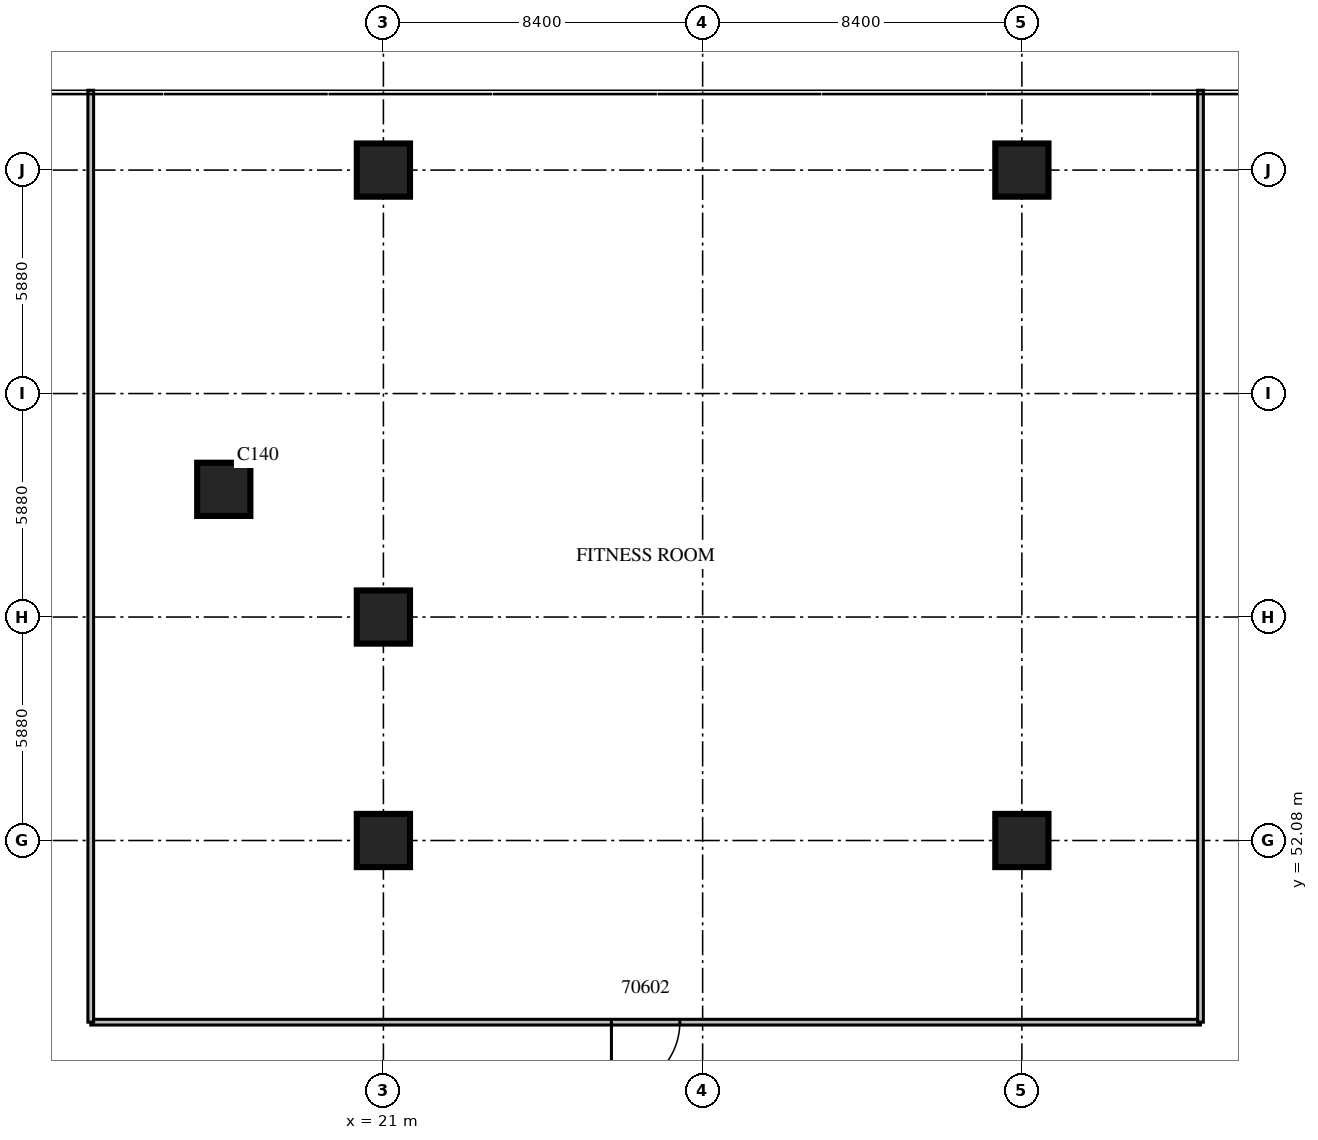
"""IFC4 building model, lengths in metres.
Left out: names, types, materials, properties, quantities, classifications, styles, units other than length and angle.
Written with IfcOpenShell. Run it as: python <this file> out.ifc"""

import sys

from ifc_helpers import new_model, si_unit, direction, frame, frame_2d, origin, origin_2d, place, context, subcontext, project, spatial, rectangle, extrude, source, transform, mapped, element, fill, save


model = new_model("IFC4")
c1 = context("Model", 3, precision=1e-05, world=origin(), true_north=direction((0.0, 1.0)))
c2 = subcontext(c1, "Body", "Model", "MODEL_VIEW")
j1 = project(units=[si_unit("LENGTHUNIT", "METRE"), si_unit("PLANEANGLEUNIT", "RADIAN")], contexts=[c1])
p1 = place(None, origin())
s1 = spatial("IfcSite", under=j1, at=p1, CompositionType="ELEMENT")
p2 = place(p1, origin())
s2 = spatial("IfcBuilding", under=s1, at=p2, CompositionType="ELEMENT")
p3 = place(p2, frame((0.0, 0.0, 18.3)))
s3 = spatial("IfcBuildingStorey", under=s2, at=p3, CompositionType="ELEMENT", Elevation=18.3)
m1 = source(origin(), c2, "Body", "SweptSolid", [
    extrude(rectangle(XDim=1.4, YDim=1.4, at=origin_2d()), origin(), (0.0, 0.0, 1.0), 5.4),
])
for number, where, z_axis, x_axis in (
    (1, (16.8, 61.32, 0.0), (0.0, 0.0, 1.0), (1.0, 0.0, 0.0)),
    (2, (21.0, 52.08, 0.0), (0.0, 0.0, 1.0), (1.0, 0.0, 0.0)),
    (3, (21.0, 57.96, 0.0), (0.0, 0.0, 1.0), (1.0, 0.0, 0.0)),
    (4, (21.0, 69.72, 0.0), (0.0, 0.0, 1.0), (1.0, 0.0, 0.0)),
    (5, (37.8, 52.08, 0.0), (0.0, 0.0, 1.0), (1.0, 0.0, 0.0)),
    (6, (37.8, 69.72, 0.0), (0.0, 0.0, 1.0), (1.0, 0.0, 0.0)),
):
    element("IfcColumn", number, at=place(p3, frame(where, z_axis=z_axis, x_axis=x_axis)), inside=s3, PredefinedType="COLUMN", context=c2, shape_type="MappedRepresentation", body=[
        mapped(m1, transform((0.0, 0.0, 0.0), scale=1.0)),
    ])
m2 = source(origin(), c2, "Body", "SweptSolid", [
    extrude(rectangle(XDim=29.2, YDim=0.15, at=frame_2d((14.6, 0.0))), origin(), (0.0, 0.0, 1.0), 4.8),
])
p4 = place(p3, frame((13.3, 47.3, 0.0), z_axis=(0.0, 0.0, 1.0), x_axis=(1.0, 0.0, 0.0)))
e7 = element("IfcWall", 7, at=p4, inside=s3, PredefinedType="PARTITIONING", context=c2, shape_type="MappedRepresentation", body=[
    mapped(m2, transform((0.0, 0.0, 0.0), scale=1.0)),
])
m3 = source(origin(), c2, "Body", "SweptSolid", [
    extrude(rectangle(XDim=1.8, YDim=2.1, at=frame_2d((0.9, 1.05))), frame((0.0, 0.085, 0.0), z_axis=(0.0, -1.0, 0.0), x_axis=(1.0, 0.0, 0.0)), (0.0, 0.0, 1.0), 0.17),
])
p5 = place(p4, frame((13.7, 0.0, 0.0)))
e8 = element("IfcOpeningElement", 8, at=p5, cuts=e7, PredefinedType="OPENING", context=c2, shape_type="MappedRepresentation", body=[
    mapped(m3, transform((0.0, 0.0, 0.0), scale=1.0)),
])
m4 = source(origin(), c2, "Body", "SweptSolid", [
    extrude(rectangle(XDim=24.52, YDim=0.15, at=frame_2d((12.26, 0.0))), origin(), (0.0, 0.0, 1.0), 4.8),
])
for number, where, z_axis, x_axis in (
    (9, (13.3, 47.3, 0.0), (0.0, 0.0, 1.0), (0.0, 1.0, 0.0)),
    (10, (42.5, 47.3, 0.0), (0.0, 0.0, 1.0), (0.0, 1.0, 0.0)),
):
    element("IfcWall", number, at=place(p3, frame(where, z_axis=z_axis, x_axis=x_axis)), inside=s3, PredefinedType="PARTITIONING", context=c2, shape_type="MappedRepresentation", body=[
        mapped(m4, transform((0.0, 0.0, 0.0), scale=1.0)),
    ])
m5 = source(origin(), c2, "Body", "SweptSolid", [
    extrude(rectangle(XDim=1.8, YDim=2.1, at=frame_2d((0.9, 1.05))), frame((0.0, 0.025, 0.0), z_axis=(0.0, -1.0, 0.0), x_axis=(1.0, 0.0, 0.0)), (0.0, 0.0, 1.0), 0.05),
])
p6 = place(p5, origin())
e11 = element("IfcDoor", 11, at=p6, inside=s3, OperationType="DOUBLE_DOOR_SINGLE_SWING", PredefinedType="DOOR", context=c2, shape_type="MappedRepresentation", body=[
    mapped(m5, transform((0.0, 0.0, 0.0), scale=1.0)),
])
fill(e8, e11)
save(model, sys.argv[1])
